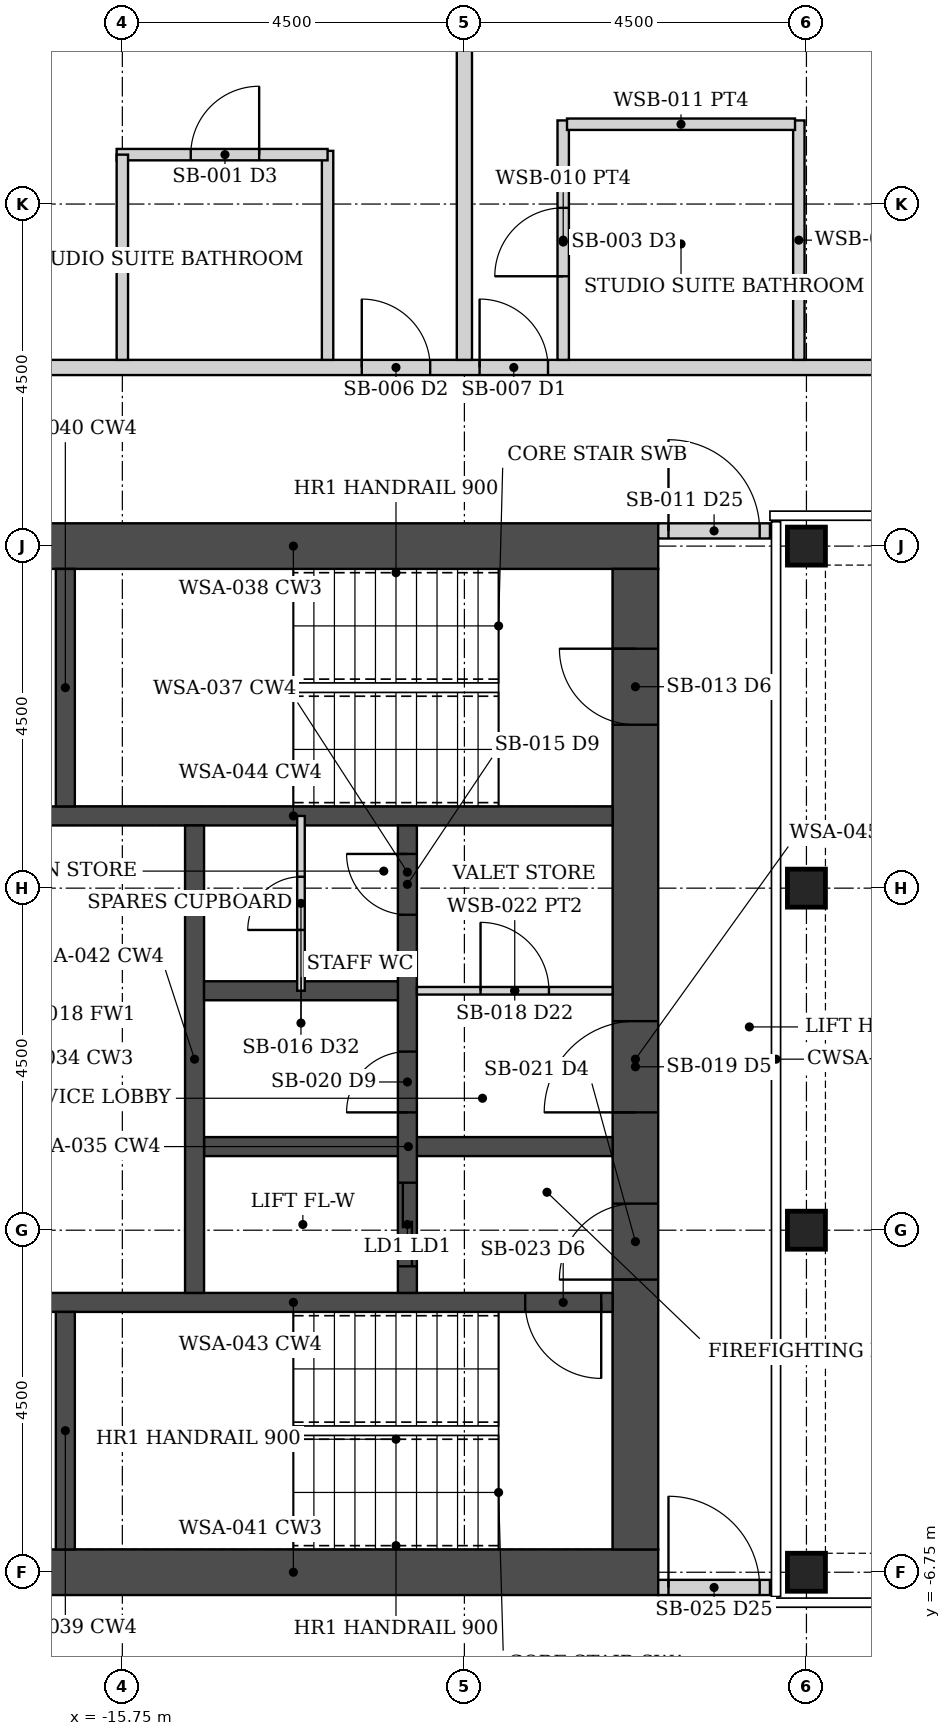
"""IFC4 building model, lengths in metres.
Left out: names, types, materials, properties, quantities, classifications, styles, units other than length and angle.
Written with IfcOpenShell. Run it as: python <this file> out.ifc"""

import sys

from ifc_helpers import new_model, si_unit, direction, frame, frame_2d, origin, origin_2d, place, context, subcontext, project, spatial, rectangle, hollow_rectangle, extrude, element, fill, save


model = new_model("IFC4")
c1 = context("Model", 3, precision=1e-05, world=origin(), true_north=direction((0.0, 1.0)))
c2 = subcontext(c1, "Body", "Model", "MODEL_VIEW")
j1 = project(units=[si_unit("LENGTHUNIT", "METRE"), si_unit("PLANEANGLEUNIT", "RADIAN")], contexts=[c1])
p1 = place(None, origin())
s1 = spatial("IfcSite", under=j1, at=p1, CompositionType="ELEMENT")
p2 = place(p1, origin())
s2 = spatial("IfcBuilding", under=s1, at=p2, CompositionType="ELEMENT")
p3 = place(p2, frame((0.0, 0.0, 212.05)))
s3 = spatial("IfcBuildingStorey", under=s2, at=p3, CompositionType="ELEMENT", Elevation=212.05)
for number, where, z_axis, x_axis in (
    (1, (-6.75, -6.75, 0.0), (0.0, 0.0, 1.0), (1.0, 0.0, 0.0)),
    (2, (-6.75, -2.25, 0.0), (0.0, 0.0, 1.0), (1.0, 0.0, 0.0)),
    (3, (-6.75, 2.25, 0.0), (0.0, 0.0, 1.0), (1.0, 0.0, 0.0)),
    (4, (-6.75, 6.75, 0.0), (0.0, 0.0, 1.0), (1.0, 0.0, 0.0)),
):
    element("IfcColumn", number, at=place(p3, frame(where, z_axis=z_axis, x_axis=x_axis)), inside=s3, PredefinedType="COLUMN", context=c2, shape_type="SweptSolid", body=[
        extrude(hollow_rectangle(XDim=0.5, YDim=0.5, WallThickness=0.03, at=origin_2d()), origin(), (0.0, 0.0, 1.0), 3.75),
    ])
for number, where, z_axis, x_axis in (
    (5, (-8.7, -6.75, 0.0), (0.0, 0.0, 1.0), (-1.0, 0.0, 0.0)),
    (6, (-8.7, 6.75, 0.0), (0.0, 0.0, 1.0), (-1.0, 0.0, 0.0)),
):
    element("IfcWall", number, at=place(p3, frame(where, z_axis=z_axis, x_axis=x_axis)), inside=s3, PredefinedType="SHEAR", context=c2, shape_type="SweptSolid", body=[
        extrude(rectangle(XDim=9.6, YDim=0.6, at=frame_2d((4.8, 0.0))), origin(), (0.0, 0.0, 1.0), 3.75),
    ])
p4 = place(p3, frame((-9.0, -6.45, 0.0), z_axis=(0.0, 0.0, 1.0), x_axis=(0.0, 1.0, 0.0)))
e7 = element("IfcWall", 7, at=p4, inside=s3, PredefinedType="SHEAR", context=c2, shape_type="SweptSolid", body=[
    extrude(rectangle(XDim=12.9, YDim=0.6, at=frame_2d((6.45, 0.0))), origin(), (0.0, 0.0, 1.0), 3.75),
])
p5 = place(p4, frame((3.55, 0.0, 0.0)))
e8 = element("IfcOpeningElement", 8, at=p5, cuts=e7, PredefinedType="OPENING", context=c2, shape_type="SweptSolid", body=[
    extrude(rectangle(XDim=1.0, YDim=2.1, at=frame_2d((0.5, 1.05))), frame((0.0, 0.31, 0.0), z_axis=(0.0, -1.0, 0.0), x_axis=(1.0, 0.0, 0.0)), (0.0, 0.0, 1.0), 0.62),
])
p6 = place(p4, frame((5.75, 0.0, 0.0)))
e9 = element("IfcOpeningElement", 9, at=p6, cuts=e7, PredefinedType="OPENING", context=c2, shape_type="SweptSolid", body=[
    extrude(rectangle(XDim=1.2, YDim=2.1, at=frame_2d((0.6, 1.05))), frame((0.0, 0.31, 0.0), z_axis=(0.0, -1.0, 0.0), x_axis=(1.0, 0.0, 0.0)), (0.0, 0.0, 1.0), 0.62),
])
p7 = place(p4, frame((10.85, 0.0, 0.0)))
e10 = element("IfcOpeningElement", 10, at=p7, cuts=e7, PredefinedType="OPENING", context=c2, shape_type="SweptSolid", body=[
    extrude(rectangle(XDim=1.0, YDim=2.1, at=frame_2d((0.5, 1.05))), frame((0.0, 0.31, 0.0), z_axis=(0.0, -1.0, 0.0), x_axis=(1.0, 0.0, 0.0)), (0.0, 0.0, 1.0), 0.62),
])
p8 = place(p3, frame((-9.3, -3.2, 0.0), z_axis=(0.0, 0.0, 1.0), x_axis=(-1.0, 0.0, 0.0)))
e11 = element("IfcWall", 11, at=p8, inside=s3, PredefinedType="SHEAR", context=c2, shape_type="SweptSolid", body=[
    extrude(rectangle(XDim=8.4, YDim=0.25, at=frame_2d((4.2, 0.0))), origin(), (0.0, 0.0, 1.0), 3.75),
])
p9 = place(p8, frame((0.15, 0.0, 0.0)))
e12 = element("IfcOpeningElement", 12, at=p9, cuts=e11, PredefinedType="OPENING", context=c2, shape_type="SweptSolid", body=[
    extrude(rectangle(XDim=1.0, YDim=2.1, at=frame_2d((0.5, 1.05))), frame((0.0, 0.135, 0.0), z_axis=(0.0, -1.0, 0.0), x_axis=(1.0, 0.0, 0.0)), (0.0, 0.0, 1.0), 0.27),
])
p10 = place(p3, frame((-9.3, 3.2, 0.0), z_axis=(0.0, 0.0, 1.0), x_axis=(-1.0, 0.0, 0.0)))
e13 = element("IfcWall", 13, at=p10, inside=s3, PredefinedType="SHEAR", context=c2, shape_type="SweptSolid", body=[
    extrude(rectangle(XDim=8.4, YDim=0.25, at=frame_2d((4.2, 0.0))), origin(), (0.0, 0.0, 1.0), 3.75),
])
for number, where, z_axis, x_axis in (
    (14, (-16.5, -6.45, 0.0), (0.0, 0.0, 1.0), (0.0, 1.0, 0.0)),
    (15, (-16.5, 3.325, 0.0), (0.0, 0.0, 1.0), (0.0, 1.0, 0.0)),
):
    element("IfcWall", number, at=place(p3, frame(where, z_axis=z_axis, x_axis=x_axis)), inside=s3, PredefinedType="SHEAR", context=c2, shape_type="SweptSolid", body=[
        extrude(rectangle(XDim=3.125, YDim=0.25, at=frame_2d((1.562, 0.0))), origin(), (0.0, 0.0, 1.0), 3.75),
    ])
p11 = place(p3, frame((-9.3, -1.15, 0.0), z_axis=(0.0, 0.0, 1.0), x_axis=(-1.0, 0.0, 0.0)))
e16 = element("IfcWall", 16, at=p11, inside=s3, PredefinedType="SHEAR", context=c2, shape_type="SweptSolid", body=[
    extrude(rectangle(XDim=5.375, YDim=0.25, at=frame_2d((2.688, 0.0))), origin(), (0.0, 0.0, 1.0), 3.75),
])
p12 = place(p3, frame((-12.0, -3.075, 0.0), z_axis=(0.0, 0.0, 1.0), x_axis=(0.0, 1.0, 0.0)))
e17 = element("IfcWall", 17, at=p12, inside=s3, PredefinedType="SHEAR", context=c2, shape_type="SweptSolid", body=[
    extrude(rectangle(XDim=6.15, YDim=0.25, at=frame_2d((3.075, 0.0))), origin(), (0.0, 0.0, 1.0), 3.75),
])
p13 = place(p12, frame((2.375, 0.0, 0.0)))
e18 = element("IfcOpeningElement", 18, at=p13, cuts=e17, PredefinedType="OPENING", context=c2, shape_type="SweptSolid", body=[
    extrude(rectangle(XDim=0.8, YDim=2.1, at=frame_2d((0.4, 1.05))), frame((0.0, 0.135, 0.0), z_axis=(0.0, -1.0, 0.0), x_axis=(1.0, 0.0, 0.0)), (0.0, 0.0, 1.0), 0.27),
])
p14 = place(p12, frame((4.975, 0.0, 0.0)))
e19 = element("IfcOpeningElement", 19, at=p14, cuts=e17, PredefinedType="OPENING", context=c2, shape_type="SweptSolid", body=[
    extrude(rectangle(XDim=0.8, YDim=2.1, at=frame_2d((0.4, 1.05))), frame((0.0, 0.135, 0.0), z_axis=(0.0, -1.0, 0.0), x_axis=(1.0, 0.0, 0.0)), (0.0, 0.0, 1.0), 0.27),
])
p15 = place(p12, frame((0.35, 0.0, 0.0)))
e20 = element("IfcOpeningElement", 20, at=p15, cuts=e17, PredefinedType="OPENING", context=c2, shape_type="SweptSolid", body=[
    extrude(rectangle(XDim=1.1, YDim=2.1, at=frame_2d((0.55, 1.05))), frame((0.0, 0.135, 0.0), z_axis=(0.0, -1.0, 0.0), x_axis=(1.0, 0.0, 0.0)), (0.0, 0.0, 1.0), 0.27),
])
p16 = place(p3, frame((-14.8, -3.075, 0.0), z_axis=(0.0, 0.0, 1.0), x_axis=(0.0, 1.0, 0.0)))
e21 = element("IfcWall", 21, at=p16, inside=s3, PredefinedType="SHEAR", context=c2, shape_type="SweptSolid", body=[
    extrude(rectangle(XDim=6.15, YDim=0.25, at=frame_2d((3.075, 0.0))), origin(), (0.0, 0.0, 1.0), 3.75),
])
p17 = place(p3, frame((-12.125, 0.9, 0.0), z_axis=(0.0, 0.0, 1.0), x_axis=(-1.0, 0.0, 0.0)))
e22 = element("IfcWall", 22, at=p17, inside=s3, PredefinedType="SHEAR", context=c2, shape_type="SweptSolid", body=[
    extrude(rectangle(XDim=2.55, YDim=0.25, at=frame_2d((1.275, 0.0))), origin(), (0.0, 0.0, 1.0), 3.75),
])
p18 = place(p3, frame((-8.7, 6.95, 0.0), z_axis=(0.0, 0.0, 1.0), x_axis=(1.0, 0.0, 0.0)))
e23 = element("IfcWall", 23, at=p18, inside=s3, PredefinedType="PARTITIONING", context=c2, shape_type="SweptSolid", body=[
    extrude(rectangle(XDim=1.47, YDim=0.2, at=frame_2d((0.735, 0.0))), origin(), (0.0, 0.0, 1.0), 2.629),
])
p19 = place(p18, frame((0.135, 0.0, 0.0)))
e24 = element("IfcOpeningElement", 24, at=p19, cuts=e23, PredefinedType="OPENING", context=c2, shape_type="SweptSolid", body=[
    extrude(rectangle(XDim=1.2, YDim=2.1, at=frame_2d((0.6, 1.05))), frame((0.0, 0.11, 0.0), z_axis=(0.0, -1.0, 0.0), x_axis=(1.0, 0.0, 0.0)), (0.0, 0.0, 1.0), 0.22),
])
p20 = place(p3, frame((-8.7, -6.95, 0.0), z_axis=(0.0, 0.0, 1.0), x_axis=(1.0, 0.0, 0.0)))
e25 = element("IfcWall", 25, at=p20, inside=s3, PredefinedType="PARTITIONING", context=c2, shape_type="SweptSolid", body=[
    extrude(rectangle(XDim=1.47, YDim=0.2, at=frame_2d((0.735, 0.0))), origin(), (0.0, 0.0, 1.0), 2.629),
])
p21 = place(p20, frame((0.135, 0.0, 0.0)))
e26 = element("IfcOpeningElement", 26, at=p21, cuts=e25, PredefinedType="OPENING", context=c2, shape_type="SweptSolid", body=[
    extrude(rectangle(XDim=1.2, YDim=2.1, at=frame_2d((0.6, 1.05))), frame((0.0, 0.11, 0.0), z_axis=(0.0, -1.0, 0.0), x_axis=(1.0, 0.0, 0.0)), (0.0, 0.0, 1.0), 0.22),
])
p22 = place(p3, frame((-20.05, 9.1, 0.0), z_axis=(0.0, 0.0, 1.0), x_axis=(1.0, 0.0, 0.0)))
e27 = element("IfcWall", 27, at=p22, inside=s3, PredefinedType="PARTITIONING", context=c2, shape_type="SweptSolid", body=[
    extrude(rectangle(XDim=40.1, YDim=0.2, at=frame_2d((20.05, 0.0))), origin(), (0.0, 0.0, 1.0), 2.629),
])
p23 = place(p22, frame((9.0, 0.0, 0.0)))
e28 = element("IfcOpeningElement", 28, at=p23, cuts=e27, PredefinedType="OPENING", context=c2, shape_type="SweptSolid", body=[
    extrude(rectangle(XDim=0.9, YDim=2.1, at=frame_2d((0.45, 1.05))), frame((0.0, 0.11, 0.0), z_axis=(0.0, -1.0, 0.0), x_axis=(1.0, 0.0, 0.0)), (0.0, 0.0, 1.0), 0.22),
])
p24 = place(p22, frame((18.0, 0.0, 0.0)))
e29 = element("IfcOpeningElement", 29, at=p24, cuts=e27, PredefinedType="OPENING", context=c2, shape_type="SweptSolid", body=[
    extrude(rectangle(XDim=0.9, YDim=2.1, at=frame_2d((0.45, 1.05))), frame((0.0, 0.11, 0.0), z_axis=(0.0, -1.0, 0.0), x_axis=(1.0, 0.0, 0.0)), (0.0, 0.0, 1.0), 0.22),
])
p25 = place(p22, frame((30.2, 0.0, 0.0)))
e30 = element("IfcOpeningElement", 30, at=p25, cuts=e27, PredefinedType="OPENING", context=c2, shape_type="SweptSolid", body=[
    extrude(rectangle(XDim=0.9, YDim=2.1, at=frame_2d((0.45, 1.05))), frame((0.0, 0.11, 0.0), z_axis=(0.0, -1.0, 0.0), x_axis=(1.0, 0.0, 0.0)), (0.0, 0.0, 1.0), 0.22),
])
p26 = place(p22, frame((31.75, 0.0, 0.0)))
e31 = element("IfcOpeningElement", 31, at=p26, cuts=e27, PredefinedType="OPENING", context=c2, shape_type="SweptSolid", body=[
    extrude(rectangle(XDim=0.9, YDim=2.1, at=frame_2d((0.45, 1.05))), frame((0.0, 0.11, 0.0), z_axis=(0.0, -1.0, 0.0), x_axis=(1.0, 0.0, 0.0)), (0.0, 0.0, 1.0), 0.22),
])
p27 = place(p22, frame((7.45, 0.0, 0.0)))
e32 = element("IfcOpeningElement", 32, at=p27, cuts=e27, PredefinedType="OPENING", context=c2, shape_type="SweptSolid", body=[
    extrude(rectangle(XDim=0.9, YDim=2.1, at=frame_2d((0.45, 1.05))), frame((0.0, 0.11, 0.0), z_axis=(0.0, -1.0, 0.0), x_axis=(1.0, 0.0, 0.0)), (0.0, 0.0, 1.0), 0.22),
])
p28 = place(p3, frame((-9.95, 9.2, 0.0), z_axis=(0.0, 0.0, 1.0), x_axis=(0.0, 1.0, 0.0)))
e33 = element("IfcWall", 33, at=p28, inside=s3, PredefinedType="PARTITIONING", context=c2, shape_type="SweptSolid", body=[
    extrude(rectangle(XDim=3.15, YDim=0.15, at=frame_2d((1.575, 0.0))), origin(), (0.0, 0.0, 1.0), 2.629),
])
p29 = place(p28, frame((1.1, 0.0, 0.0)))
e34 = element("IfcOpeningElement", 34, at=p29, cuts=e33, PredefinedType="OPENING", context=c2, shape_type="SweptSolid", body=[
    extrude(rectangle(XDim=0.9, YDim=2.1, at=frame_2d((0.45, 1.05))), frame((0.0, 0.085, 0.0), z_axis=(0.0, -1.0, 0.0), x_axis=(1.0, 0.0, 0.0)), (0.0, 0.0, 1.0), 0.17),
])
p30 = place(p3, frame((-6.85, 9.2, 0.0), z_axis=(0.0, 0.0, 1.0), x_axis=(0.0, 1.0, 0.0)))
e35 = element("IfcWall", 35, at=p30, inside=s3, PredefinedType="PARTITIONING", context=c2, shape_type="SweptSolid", body=[
    extrude(rectangle(XDim=3.15, YDim=0.15, at=frame_2d((1.575, 0.0))), origin(), (0.0, 0.0, 1.0), 2.629),
])
p31 = place(p3, frame((-9.9, 12.3, 0.0), z_axis=(0.0, 0.0, 1.0), x_axis=(1.0, 0.0, 0.0)))
e36 = element("IfcWall", 36, at=p31, inside=s3, PredefinedType="PARTITIONING", context=c2, shape_type="SweptSolid", body=[
    extrude(rectangle(XDim=3.0, YDim=0.15, at=frame_2d((1.5, 0.0))), origin(), (0.0, 0.0, 1.0), 2.629),
])
p32 = place(p3, frame((-11.25, 9.2, 0.0), z_axis=(0.0, 0.0, 1.0), x_axis=(0.0, 1.0, 0.0)))
e37 = element("IfcWall", 37, at=p32, inside=s3, PredefinedType="PARTITIONING", context=c2, shape_type="SweptSolid", body=[
    extrude(rectangle(XDim=10.7, YDim=0.2, at=frame_2d((5.35, 0.0))), origin(), (0.0, 0.0, 1.0), 2.629),
])
p33 = place(p3, frame((-13.05, 9.2, 0.0), z_axis=(0.0, 0.0, 1.0), x_axis=(0.0, 1.0, 0.0)))
e38 = element("IfcWall", 38, at=p33, inside=s3, PredefinedType="PARTITIONING", context=c2, shape_type="SweptSolid", body=[
    extrude(rectangle(XDim=2.75, YDim=0.15, at=frame_2d((1.375, 0.0))), origin(), (0.0, 0.0, 1.0), 2.629),
])
p34 = place(p3, frame((-15.825, 11.9, 0.0), z_axis=(0.0, 0.0, 1.0), x_axis=(1.0, 0.0, 0.0)))
e39 = element("IfcWall", 39, at=p34, inside=s3, PredefinedType="PARTITIONING", context=c2, shape_type="SweptSolid", body=[
    extrude(rectangle(XDim=2.775, YDim=0.15, at=frame_2d((1.387, 0.0))), origin(), (0.0, 0.0, 1.0), 2.629),
])
p35 = place(p34, frame((0.975, 0.0, 0.0)))
e40 = element("IfcOpeningElement", 40, at=p35, cuts=e39, PredefinedType="OPENING", context=c2, shape_type="SweptSolid", body=[
    extrude(rectangle(XDim=0.9, YDim=2.1, at=frame_2d((0.45, 1.05))), frame((0.0, 0.085, 0.0), z_axis=(0.0, -1.0, 0.0), x_axis=(1.0, 0.0, 0.0)), (0.0, 0.0, 1.0), 0.17),
])
p36 = place(p3, frame((-15.75, 9.2, 0.0), z_axis=(0.0, 0.0, 1.0), x_axis=(0.0, 1.0, 0.0)))
e41 = element("IfcWall", 41, at=p36, inside=s3, PredefinedType="PARTITIONING", context=c2, shape_type="SweptSolid", body=[
    extrude(rectangle(XDim=2.7, YDim=0.15, at=frame_2d((1.35, 0.0))), origin(), (0.0, 0.0, 1.0), 2.629),
])
p37 = place(p3, frame((-11.875, 0.9, 0.0), z_axis=(0.0, 0.0, 1.0), x_axis=(1.0, 0.0, 0.0)))
e42 = element("IfcWall", 42, at=p37, inside=s3, PredefinedType="PARTITIONING", context=c2, shape_type="SweptSolid", body=[
    extrude(rectangle(XDim=2.575, YDim=0.1, at=frame_2d((1.288, 0.0))), origin(), (0.0, 0.0, 1.0), 2.629),
])
p38 = place(p37, frame((0.837, 0.0, 0.0)))
e43 = element("IfcOpeningElement", 43, at=p38, cuts=e42, PredefinedType="OPENING", context=c2, shape_type="SweptSolid", body=[
    extrude(rectangle(XDim=0.9, YDim=2.1, at=frame_2d((0.45, 1.05))), frame((0.0, 0.06, 0.0), z_axis=(0.0, -1.0, 0.0), x_axis=(1.0, 0.0, 0.0)), (0.0, 0.0, 1.0), 0.12),
])
p39 = place(p3, frame((-13.4, 0.9, 0.0), z_axis=(0.0, 0.0, 1.0), x_axis=(0.0, 1.0, 0.0)))
e44 = element("IfcWall", 44, at=p39, inside=s3, PredefinedType="PARTITIONING", context=c2, shape_type="SweptSolid", body=[
    extrude(rectangle(XDim=2.3, YDim=0.1, at=frame_2d((1.15, 0.0))), origin(), (0.0, 0.0, 1.0), 2.629),
])
p40 = place(p39, frame((0.8, 0.0, 0.0)))
e45 = element("IfcOpeningElement", 45, at=p40, cuts=e44, PredefinedType="OPENING", context=c2, shape_type="SweptSolid", body=[
    extrude(rectangle(XDim=0.7, YDim=2.1, at=frame_2d((0.35, 1.05))), frame((0.0, 0.06, 0.0), z_axis=(0.0, -1.0, 0.0), x_axis=(1.0, 0.0, 0.0)), (0.0, 0.0, 1.0), 0.12),
])
p41 = place(p19, origin())
e46 = element("IfcDoor", 46, at=p41, inside=s3, OperationType="DOUBLE_DOOR_DOUBLE_SWING", PredefinedType="DOOR", context=c2, shape_type="SweptSolid", body=[
    extrude(rectangle(XDim=1.2, YDim=2.1, at=frame_2d((0.6, 1.05))), frame((0.0, 0.025, 0.0), z_axis=(0.0, -1.0, 0.0), x_axis=(1.0, 0.0, 0.0)), (0.0, 0.0, 1.0), 0.05),
])
fill(e24, e46)
p42 = place(p21, origin())
e47 = element("IfcDoor", 47, at=p42, inside=s3, OperationType="DOUBLE_DOOR_DOUBLE_SWING", PredefinedType="DOOR", context=c2, shape_type="SweptSolid", body=[
    extrude(rectangle(XDim=1.2, YDim=2.1, at=frame_2d((0.6, 1.05))), frame((0.0, 0.025, 0.0), z_axis=(0.0, -1.0, 0.0), x_axis=(1.0, 0.0, 0.0)), (0.0, 0.0, 1.0), 0.05),
])
fill(e26, e47)
p43 = place(p23, origin())
e48 = element("IfcDoor", 48, at=p43, inside=s3, OperationType="SINGLE_SWING_LEFT", PredefinedType="DOOR", context=c2, shape_type="SweptSolid", body=[
    extrude(rectangle(XDim=0.9, YDim=2.1, at=frame_2d((0.45, 1.05))), frame((0.0, 0.025, 0.0), z_axis=(0.0, -1.0, 0.0), x_axis=(1.0, 0.0, 0.0)), (0.0, 0.0, 1.0), 0.05),
])
fill(e28, e48)
p44 = place(p29, origin())
e49 = element("IfcDoor", 49, at=p44, inside=s3, OperationType="SINGLE_SWING_LEFT", PredefinedType="DOOR", context=c2, shape_type="SweptSolid", body=[
    extrude(rectangle(XDim=0.9, YDim=2.1, at=frame_2d((0.45, 1.05))), frame((0.0, 0.025, 0.0), z_axis=(0.0, -1.0, 0.0), x_axis=(1.0, 0.0, 0.0)), (0.0, 0.0, 1.0), 0.05),
])
fill(e34, e49)
p45 = place(p27, origin())
e50 = element("IfcDoor", 50, at=p45, inside=s3, OperationType="SINGLE_SWING_LEFT", PredefinedType="DOOR", context=c2, shape_type="SweptSolid", body=[
    extrude(rectangle(XDim=0.9, YDim=2.1, at=frame_2d((0.45, 1.05))), frame((0.0, 0.025, 0.0), z_axis=(0.0, -1.0, 0.0), x_axis=(1.0, 0.0, 0.0)), (0.0, 0.0, 1.0), 0.05),
])
fill(e32, e50)
p46 = place(p35, origin())
e51 = element("IfcDoor", 51, at=p46, inside=s3, OperationType="SINGLE_SWING_RIGHT", PredefinedType="DOOR", context=c2, shape_type="SweptSolid", body=[
    extrude(rectangle(XDim=0.9, YDim=2.1, at=frame_2d((0.45, 1.05))), frame((0.0, 0.025, 0.0), z_axis=(0.0, -1.0, 0.0), x_axis=(1.0, 0.0, 0.0)), (0.0, 0.0, 1.0), 0.05),
])
fill(e40, e51)
p47 = place(p5, origin())
e52 = element("IfcDoor", 52, at=p47, inside=s3, OperationType="SINGLE_SWING_LEFT", PredefinedType="DOOR", context=c2, shape_type="SweptSolid", body=[
    extrude(rectangle(XDim=1.0, YDim=2.1, at=frame_2d((0.5, 1.05))), frame((0.0, 0.025, 0.0), z_axis=(0.0, -1.0, 0.0), x_axis=(1.0, 0.0, 0.0)), (0.0, 0.0, 1.0), 0.05),
])
fill(e8, e52)
p48 = place(p9, origin())
e53 = element("IfcDoor", 53, at=p48, inside=s3, OperationType="SINGLE_SWING_LEFT", PredefinedType="DOOR", context=c2, shape_type="SweptSolid", body=[
    extrude(rectangle(XDim=1.0, YDim=2.1, at=frame_2d((0.5, 1.05))), frame((0.0, 0.025, 0.0), z_axis=(0.0, -1.0, 0.0), x_axis=(1.0, 0.0, 0.0)), (0.0, 0.0, 1.0), 0.05),
])
fill(e12, e53)
p49 = place(p38, origin())
e54 = element("IfcDoor", 54, at=p49, inside=s3, OperationType="SINGLE_SWING_LEFT", PredefinedType="DOOR", context=c2, shape_type="SweptSolid", body=[
    extrude(rectangle(XDim=0.9, YDim=2.1, at=frame_2d((0.45, 1.05))), frame((0.0, 0.025, 0.0), z_axis=(0.0, -1.0, 0.0), x_axis=(1.0, 0.0, 0.0)), (0.0, 0.0, 1.0), 0.05),
])
fill(e43, e54)
p50 = place(p6, origin())
e55 = element("IfcDoor", 55, at=p50, inside=s3, OperationType="SINGLE_SWING_LEFT", PredefinedType="DOOR", context=c2, shape_type="SweptSolid", body=[
    extrude(rectangle(XDim=1.2, YDim=2.1, at=frame_2d((0.6, 1.05))), frame((0.0, 0.025, 0.0), z_axis=(0.0, -1.0, 0.0), x_axis=(1.0, 0.0, 0.0)), (0.0, 0.0, 1.0), 0.05),
])
fill(e9, e55)
p51 = place(p13, origin())
e56 = element("IfcDoor", 56, at=p51, inside=s3, OperationType="SINGLE_SWING_LEFT", PredefinedType="DOOR", context=c2, shape_type="SweptSolid", body=[
    extrude(rectangle(XDim=0.8, YDim=2.1, at=frame_2d((0.4, 1.05))), frame((0.0, 0.025, 0.0), z_axis=(0.0, -1.0, 0.0), x_axis=(1.0, 0.0, 0.0)), (0.0, 0.0, 1.0), 0.05),
])
fill(e18, e56)
p52 = place(p40, origin())
e57 = element("IfcDoor", 57, at=p52, inside=s3, OperationType="SINGLE_SWING_LEFT", PredefinedType="DOOR", context=c2, shape_type="SweptSolid", body=[
    extrude(rectangle(XDim=0.7, YDim=2.1, at=frame_2d((0.35, 1.05))), frame((0.0, 0.025, 0.0), z_axis=(0.0, -1.0, 0.0), x_axis=(1.0, 0.0, 0.0)), (0.0, 0.0, 1.0), 0.05),
])
fill(e45, e57)
p53 = place(p14, origin())
e58 = element("IfcDoor", 58, at=p53, inside=s3, OperationType="SINGLE_SWING_RIGHT", PredefinedType="DOOR", context=c2, shape_type="SweptSolid", body=[
    extrude(rectangle(XDim=0.8, YDim=2.1, at=frame_2d((0.4, 1.05))), frame((0.0, 0.025, 0.0), z_axis=(0.0, -1.0, 0.0), x_axis=(1.0, 0.0, 0.0)), (0.0, 0.0, 1.0), 0.05),
])
fill(e19, e58)
p54 = place(p7, origin())
e59 = element("IfcDoor", 59, at=p54, inside=s3, OperationType="SINGLE_SWING_RIGHT", PredefinedType="DOOR", context=c2, shape_type="SweptSolid", body=[
    extrude(rectangle(XDim=1.0, YDim=2.1, at=frame_2d((0.5, 1.05))), frame((0.0, 0.025, 0.0), z_axis=(0.0, -1.0, 0.0), x_axis=(1.0, 0.0, 0.0)), (0.0, 0.0, 1.0), 0.05),
])
fill(e10, e59)
p55 = place(p15, origin())
e60 = element("IfcDoor", 60, at=p55, inside=s3, OperationType="DOUBLE_DOOR_SLIDING", PredefinedType="DOOR", context=c2, shape_type="SweptSolid", body=[
    extrude(rectangle(XDim=1.1, YDim=2.1, at=frame_2d((0.55, 1.05))), frame((0.0, 0.025, 0.0), z_axis=(0.0, -1.0, 0.0), x_axis=(1.0, 0.0, 0.0)), (0.0, 0.0, 1.0), 0.05),
])
fill(e20, e60)
save(model, sys.argv[1])
